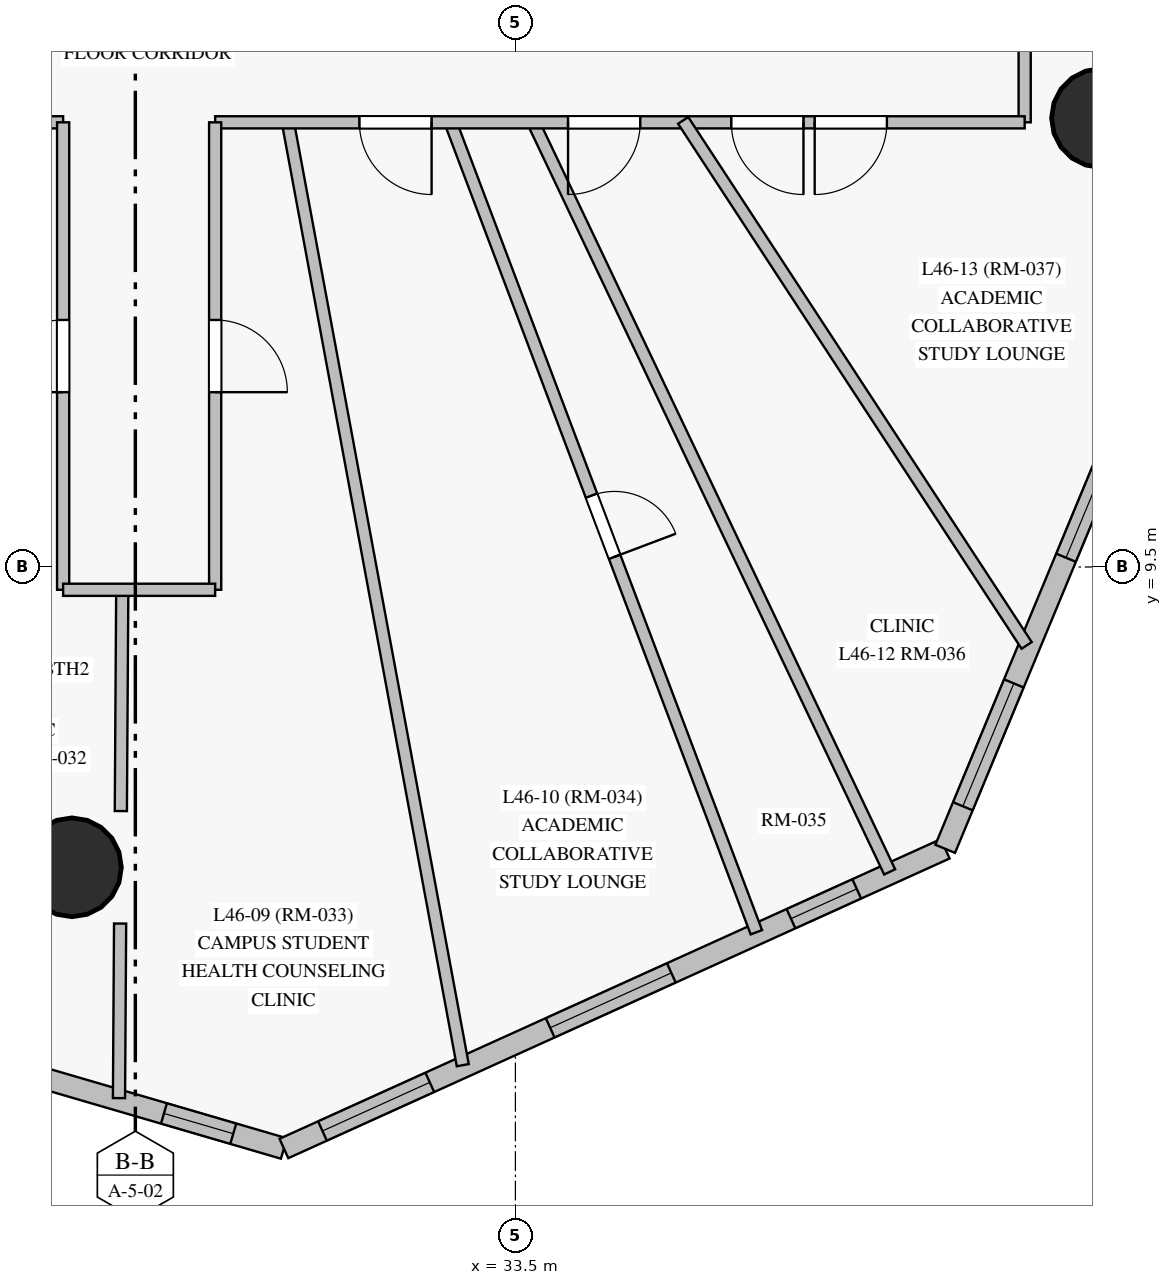
"""IFC4 building model, lengths in metres.
Left out: names, types, materials, properties, quantities, classifications, styles, units other than length and angle.
Written with IfcOpenShell. Run it as: python <this file> out.ifc"""

import sys

from ifc_helpers import new_model, si_unit, direction, frame, frame_2d, origin, origin_with_axes, origin_2d, place, context, subcontext, project, spatial, rectangle, circle, extrude, source, transform, mapped, element, fill, save


model = new_model("IFC4")
c1 = context("Model", 3, precision=1e-05, world=origin(), true_north=direction((0.0, 1.0)))
c2 = subcontext(c1, "Body", "Model", "MODEL_VIEW")
j1 = project(units=[si_unit("LENGTHUNIT", "METRE"), si_unit("PLANEANGLEUNIT", "RADIAN")], contexts=[c1])
p1 = place(None, origin())
s1 = spatial("IfcSite", under=j1, at=p1, CompositionType="ELEMENT")
p2 = place(p1, origin())
s2 = spatial("IfcBuilding", under=s1, at=p2, CompositionType="ELEMENT")
p3 = place(p2, frame((0.0, 0.0, 162.65)))
s3 = spatial("IfcBuildingStorey", under=s2, at=p3, CompositionType="ELEMENT", Elevation=162.65)
m1 = source(origin_with_axes(), c2, "Body", "SweptSolid", [
    extrude(circle(Radius=0.65, at=origin_2d()), origin(), (0.0, 0.0, 1.0), 3.05),
])
for number, where, z_axis, x_axis in (
    (1, (27.666, 5.549, 0.0), (0.0, 0.0, 1.0), (1.0, 0.0, 0.0)),
    (2, (41.204, 15.406, 0.0), (0.0, 0.0, 1.0), (1.0, 0.0, 0.0)),
):
    element("IfcColumn", number, at=place(p3, frame(where, z_axis=z_axis, x_axis=x_axis)), inside=s3, PredefinedType="COLUMN", context=c2, shape_type="MappedRepresentation", body=[
        mapped(m1, transform((0.0, 0.0, 0.0), scale=1.0)),
    ])
p4 = place(p3, frame((18.885, 5.23, 0.0), z_axis=(0.0, 0.0, 1.0), x_axis=(0.959880587049, -0.280409091519, 0.0)))
e3 = element("IfcWall", 3, at=p4, inside=s3, PredefinedType="SOLIDWALL", context=c2, shape_type="SweptSolid", body=[
    extrude(rectangle(XDim=12.053, YDim=0.28, at=frame_2d((6.027, 0.0))), origin(), (0.0, 0.0, 1.0), 2.825),
])
p5 = place(p4, frame((0.763, 0.0, 0.85)))
e4 = element("IfcOpeningElement", 4, at=p5, cuts=e3, PredefinedType="OPENING", context=c2, shape_type="SweptSolid", body=[
    extrude(rectangle(XDim=1.75, YDim=1.65, at=frame_2d((0.875, 0.825))), frame((0.0, 0.15, 0.0), z_axis=(0.0, -1.0, 0.0), x_axis=(1.0, 0.0, 0.0)), (0.0, 0.0, 1.0), 0.3),
])
p6 = place(p4, frame((3.679, 0.0, 0.85)))
e5 = element("IfcOpeningElement", 5, at=p6, cuts=e3, PredefinedType="OPENING", context=c2, shape_type="SweptSolid", body=[
    extrude(rectangle(XDim=1.55, YDim=1.65, at=frame_2d((0.775, 0.825))), frame((0.0, 0.15, 0.0), z_axis=(0.0, -1.0, 0.0), x_axis=(1.0, 0.0, 0.0)), (0.0, 0.0, 1.0), 0.3),
])
p7 = place(p4, frame((6.859, 0.0, 0.85)))
e6 = element("IfcOpeningElement", 6, at=p7, cuts=e3, PredefinedType="OPENING", context=c2, shape_type="SweptSolid", body=[
    extrude(rectangle(XDim=1.75, YDim=1.65, at=frame_2d((0.875, 0.825))), frame((0.0, 0.15, 0.0), z_axis=(0.0, -1.0, 0.0), x_axis=(1.0, 0.0, 0.0)), (0.0, 0.0, 1.0), 0.3),
])
p8 = place(p4, frame((10.409, 0.0, 0.85)))
e7 = element("IfcOpeningElement", 7, at=p8, cuts=e3, PredefinedType="OPENING", context=c2, shape_type="SweptSolid", body=[
    extrude(rectangle(XDim=0.95, YDim=1.5, at=frame_2d((0.475, 0.75))), frame((0.0, 0.15, 0.0), z_axis=(0.0, -1.0, 0.0), x_axis=(1.0, 0.0, 0.0)), (0.0, 0.0, 1.0), 0.3),
])
p9 = place(p3, frame((30.454, 1.85, 0.0), z_axis=(0.0, 0.0, 1.0), x_axis=(0.910849042107, 0.412739654617, 0.0)))
e8 = element("IfcWall", 8, at=p9, inside=s3, PredefinedType="SOLIDWALL", context=c2, shape_type="SweptSolid", body=[
    extrude(rectangle(XDim=9.552, YDim=0.28, at=frame_2d((4.776, 0.0))), origin(), (0.0, 0.0, 1.0), 2.825),
])
p10 = place(p9, frame((0.557, 0.0, 0.85)))
e9 = element("IfcOpeningElement", 9, at=p10, cuts=e8, PredefinedType="OPENING", context=c2, shape_type="SweptSolid", body=[
    extrude(rectangle(XDim=1.55, YDim=1.65, at=frame_2d((0.775, 0.825))), frame((0.0, 0.15, 0.0), z_axis=(0.0, -1.0, 0.0), x_axis=(1.0, 0.0, 0.0)), (0.0, 0.0, 1.0), 0.3),
])
p11 = place(p9, frame((3.846, 0.0, 0.85)))
e10 = element("IfcOpeningElement", 10, at=p11, cuts=e8, PredefinedType="OPENING", context=c2, shape_type="SweptSolid", body=[
    extrude(rectangle(XDim=1.75, YDim=1.65, at=frame_2d((0.875, 0.825))), frame((0.0, 0.15, 0.0), z_axis=(0.0, -1.0, 0.0), x_axis=(1.0, 0.0, 0.0)), (0.0, 0.0, 1.0), 0.3),
])
p12 = place(p9, frame((7.324, 0.0, 0.85)))
e11 = element("IfcOpeningElement", 11, at=p12, cuts=e8, PredefinedType="OPENING", context=c2, shape_type="SweptSolid", body=[
    extrude(rectangle(XDim=0.95, YDim=1.5, at=frame_2d((0.475, 0.75))), frame((0.0, 0.15, 0.0), z_axis=(0.0, -1.0, 0.0), x_axis=(1.0, 0.0, 0.0)), (0.0, 0.0, 1.0), 0.3),
])
p13 = place(p3, frame((39.155, 5.792, 0.0), z_axis=(0.0, 0.0, 1.0), x_axis=(0.383396812416, 0.92358371804, 0.0)))
e12 = element("IfcWall", 12, at=p13, inside=s3, PredefinedType="SOLIDWALL", context=c2, shape_type="SweptSolid", body=[
    extrude(rectangle(XDim=13.959, YDim=0.28, at=frame_2d((6.98, 0.0))), origin(), (0.0, 0.0, 1.0), 2.825),
])
p14 = place(p13, frame((0.606, 0.0, 0.85)))
e13 = element("IfcOpeningElement", 13, at=p14, cuts=e12, PredefinedType="OPENING", context=c2, shape_type="SweptSolid", body=[
    extrude(rectangle(XDim=1.75, YDim=1.65, at=frame_2d((0.875, 0.825))), frame((0.0, 0.15, 0.0), z_axis=(0.0, -1.0, 0.0), x_axis=(1.0, 0.0, 0.0)), (0.0, 0.0, 1.0), 0.3),
])
p15 = place(p13, frame((4.146, 0.0, 0.85)))
e14 = element("IfcOpeningElement", 14, at=p15, cuts=e12, PredefinedType="OPENING", context=c2, shape_type="SweptSolid", body=[
    extrude(rectangle(XDim=1.75, YDim=1.65, at=frame_2d((0.875, 0.825))), frame((0.0, 0.15, 0.0), z_axis=(0.0, -1.0, 0.0), x_axis=(1.0, 0.0, 0.0)), (0.0, 0.0, 1.0), 0.3),
])
p16 = place(p13, frame((7.745, 0.0, 0.85)))
e15 = element("IfcOpeningElement", 15, at=p16, cuts=e12, PredefinedType="OPENING", context=c2, shape_type="SweptSolid", body=[
    extrude(rectangle(XDim=1.75, YDim=1.65, at=frame_2d((0.875, 0.825))), frame((0.0, 0.15, 0.0), z_axis=(0.0, -1.0, 0.0), x_axis=(1.0, 0.0, 0.0)), (0.0, 0.0, 1.0), 0.3),
])
p17 = place(p13, frame((11.444, 0.0, 0.85)))
e16 = element("IfcOpeningElement", 16, at=p17, cuts=e12, PredefinedType="OPENING", context=c2, shape_type="SweptSolid", body=[
    extrude(rectangle(XDim=1.75, YDim=1.65, at=frame_2d((0.875, 0.825))), frame((0.0, 0.15, 0.0), z_axis=(0.0, -1.0, 0.0), x_axis=(1.0, 0.0, 0.0)), (0.0, 0.0, 1.0), 0.3),
])
p18 = place(p3, frame((40.2, 37.65, 0.0), z_axis=(0.0, 0.0, 1.0), x_axis=(0.0, -1.0, 0.0)))
e17 = element("IfcWall", 17, at=p18, inside=s3, PredefinedType="PARTITIONING", context=c2, shape_type="SweptSolid", body=[
    extrude(rectangle(XDim=22.3, YDim=0.16, at=frame_2d((11.15, 0.0))), origin(), (0.0, 0.0, 1.0), 2.375),
])
p19 = place(p18, frame((14.02, 0.0, 0.0)))
e18 = element("IfcOpeningElement", 18, at=p19, cuts=e17, PredefinedType="OPENING", context=c2, shape_type="SweptSolid", body=[
    extrude(rectangle(XDim=0.95, YDim=2.15, at=frame_2d((0.475, 1.075))), frame((0.0, 0.09, 0.0), z_axis=(0.0, -1.0, 0.0), x_axis=(1.0, 0.0, 0.0)), (0.0, 0.0, 1.0), 0.18),
])
p20 = place(p18, frame((10.675, 0.0, 0.0)))
e19 = element("IfcOpeningElement", 19, at=p20, cuts=e17, PredefinedType="OPENING", context=c2, shape_type="SweptSolid", body=[
    extrude(rectangle(XDim=0.95, YDim=2.15, at=frame_2d((0.475, 1.075))), frame((0.0, 0.09, 0.0), z_axis=(0.0, -1.0, 0.0), x_axis=(1.0, 0.0, 0.0)), (0.0, 0.0, 1.0), 0.18),
])
p21 = place(p18, frame((7.33, 0.0, 0.0)))
e20 = element("IfcOpeningElement", 20, at=p21, cuts=e17, PredefinedType="OPENING", context=c2, shape_type="SweptSolid", body=[
    extrude(rectangle(XDim=0.95, YDim=2.15, at=frame_2d((0.475, 1.075))), frame((0.0, 0.09, 0.0), z_axis=(0.0, -1.0, 0.0), x_axis=(1.0, 0.0, 0.0)), (0.0, 0.0, 1.0), 0.18),
])
p22 = place(p18, frame((2.5, 0.0, 0.0)))
e21 = element("IfcOpeningElement", 21, at=p22, cuts=e17, PredefinedType="OPENING", context=c2, shape_type="SweptSolid", body=[
    extrude(rectangle(XDim=0.95, YDim=2.15, at=frame_2d((0.475, 1.075))), frame((0.0, 0.09, 0.0), z_axis=(0.0, -1.0, 0.0), x_axis=(1.0, 0.0, 0.0)), (0.0, 0.0, 1.0), 0.18),
])
p23 = place(p3, frame((30.501, 15.379, 0.0), z_axis=(0.0, 0.0, 1.0), x_axis=(0.182367171239, -0.983230499351, 0.0)))
e22 = element("IfcWall", 22, at=p23, inside=s3, PredefinedType="PARTITIONING", context=c2, shape_type="SweptSolid", body=[
    extrude(rectangle(XDim=12.646, YDim=0.16, at=frame_2d((6.323, 0.0))), origin(), (0.0, 0.0, 1.0), 2.825),
])
p24 = place(p3, frame((32.636, 15.378, 0.0), z_axis=(0.0, 0.0, 1.0), x_axis=(0.353270856326, -0.93552108585, 0.0)))
e23 = element("IfcWall", 23, at=p24, inside=s3, PredefinedType="PARTITIONING", context=c2, shape_type="SweptSolid", body=[
    extrude(rectangle(XDim=11.42, YDim=0.16, at=frame_2d((5.71, 0.0))), origin(), (0.0, 0.0, 1.0), 2.825),
])
p25 = place(p24, frame((5.28, 0.0, 0.0)))
e24 = element("IfcOpeningElement", 24, at=p25, cuts=e23, PredefinedType="OPENING", context=c2, shape_type="SweptSolid", body=[
    extrude(rectangle(XDim=0.86, YDim=2.04, at=frame_2d((0.43, 1.02))), frame((0.0, 0.09, 0.0), z_axis=(0.0, -1.0, 0.0), x_axis=(1.0, 0.0, 0.0)), (0.0, 0.0, 1.0), 0.18),
])
p26 = place(p3, frame((33.722, 15.377, 0.0), z_axis=(0.0, 0.0, 1.0), x_axis=(0.429403808609, -0.903112600483, 0.0)))
e25 = element("IfcWall", 25, at=p26, inside=s3, PredefinedType="PARTITIONING", context=c2, shape_type="SweptSolid", body=[
    extrude(rectangle(XDim=10.949, YDim=0.16, at=frame_2d((5.475, 0.0))), origin(), (0.0, 0.0, 1.0), 2.825),
])
p27 = place(p3, frame((27.55, 15.35, 0.0), z_axis=(0.0, 0.0, 1.0), x_axis=(-1.0, 0.0, 0.0)))
e26 = element("IfcWall", 26, at=p27, inside=s3, PredefinedType="PARTITIONING", context=c2, shape_type="SweptSolid", body=[
    extrude(rectangle(XDim=10.85, YDim=0.16, at=frame_2d((5.425, 0.0))), origin(), (0.0, 0.0, 1.0), 2.375),
])
p28 = place(p27, frame((7.268, 0.0, 0.0)))
e27 = element("IfcOpeningElement", 27, at=p28, cuts=e26, PredefinedType="OPENING", context=c2, shape_type="SweptSolid", body=[
    extrude(rectangle(XDim=0.95, YDim=2.15, at=frame_2d((0.475, 1.075))), frame((0.0, 0.09, 0.0), z_axis=(0.0, -1.0, 0.0), x_axis=(1.0, 0.0, 0.0)), (0.0, 0.0, 1.0), 0.18),
])
p29 = place(p27, frame((4.95, 0.0, 0.0)))
e28 = element("IfcOpeningElement", 28, at=p29, cuts=e26, PredefinedType="OPENING", context=c2, shape_type="SweptSolid", body=[
    extrude(rectangle(XDim=0.95, YDim=2.15, at=frame_2d((0.475, 1.075))), frame((0.0, 0.09, 0.0), z_axis=(0.0, -1.0, 0.0), x_axis=(1.0, 0.0, 0.0)), (0.0, 0.0, 1.0), 0.18),
])
p30 = place(p27, frame((3.282, 0.0, 0.0)))
e29 = element("IfcOpeningElement", 29, at=p30, cuts=e26, PredefinedType="OPENING", context=c2, shape_type="SweptSolid", body=[
    extrude(rectangle(XDim=0.95, YDim=2.15, at=frame_2d((0.475, 1.075))), frame((0.0, 0.09, 0.0), z_axis=(0.0, -1.0, 0.0), x_axis=(1.0, 0.0, 0.0)), (0.0, 0.0, 1.0), 0.18),
])
p31 = place(p3, frame((40.2, 15.35, 0.0), z_axis=(0.0, 0.0, 1.0), x_axis=(-1.0, 0.0, 0.0)))
e30 = element("IfcWall", 30, at=p31, inside=s3, PredefinedType="PARTITIONING", context=c2, shape_type="SweptSolid", body=[
    extrude(rectangle(XDim=10.65, YDim=0.16, at=frame_2d((5.325, 0.0))), origin(), (0.0, 0.0, 1.0), 2.275),
])
p32 = place(p31, frame((7.802, 0.0, 0.0)))
e31 = element("IfcOpeningElement", 31, at=p32, cuts=e30, PredefinedType="OPENING", context=c2, shape_type="SweptSolid", body=[
    extrude(rectangle(XDim=0.95, YDim=2.15, at=frame_2d((0.475, 1.075))), frame((0.0, 0.09, 0.0), z_axis=(0.0, -1.0, 0.0), x_axis=(1.0, 0.0, 0.0)), (0.0, 0.0, 1.0), 0.18),
])
p33 = place(p31, frame((5.058, 0.0, 0.0)))
e32 = element("IfcOpeningElement", 32, at=p33, cuts=e30, PredefinedType="OPENING", context=c2, shape_type="SweptSolid", body=[
    extrude(rectangle(XDim=0.95, YDim=2.15, at=frame_2d((0.475, 1.075))), frame((0.0, 0.09, 0.0), z_axis=(0.0, -1.0, 0.0), x_axis=(1.0, 0.0, 0.0)), (0.0, 0.0, 1.0), 0.18),
])
p34 = place(p31, frame((2.91, 0.0, 0.0)))
e33 = element("IfcOpeningElement", 33, at=p34, cuts=e30, PredefinedType="OPENING", context=c2, shape_type="SweptSolid", body=[
    extrude(rectangle(XDim=0.95, YDim=2.15, at=frame_2d((0.475, 1.075))), frame((0.0, 0.09, 0.0), z_axis=(0.0, -1.0, 0.0), x_axis=(1.0, 0.0, 0.0)), (0.0, 0.0, 1.0), 0.18),
])
p35 = place(p31, frame((1.812, 0.0, 0.0)))
e34 = element("IfcOpeningElement", 34, at=p35, cuts=e30, PredefinedType="OPENING", context=c2, shape_type="SweptSolid", body=[
    extrude(rectangle(XDim=0.95, YDim=2.15, at=frame_2d((0.475, 1.075))), frame((0.0, 0.09, 0.0), z_axis=(0.0, -1.0, 0.0), x_axis=(1.0, 0.0, 0.0)), (0.0, 0.0, 1.0), 0.18),
])
p36 = place(p3, frame((35.707, 15.375, 0.0), z_axis=(0.0, 0.0, 1.0), x_axis=(0.547512330947, -0.836797614397, 0.0)))
e35 = element("IfcWall", 35, at=p36, inside=s3, PredefinedType="PARTITIONING", context=c2, shape_type="SweptSolid", body=[
    extrude(rectangle(XDim=8.254, YDim=0.16, at=frame_2d((4.127, 0.0))), origin(), (0.0, 0.0, 1.0), 2.825),
])
p37 = place(p3, frame((29.55, 15.35, 0.0), z_axis=(0.0, 0.0, 1.0), x_axis=(0.0, -1.0, 0.0)))
e36 = element("IfcWall", 36, at=p37, inside=s3, PredefinedType="PARTITIONING", context=c2, shape_type="SweptSolid", body=[
    extrude(rectangle(XDim=6.15, YDim=0.16, at=frame_2d((3.075, 0.0))), origin(), (0.0, 0.0, 1.0), 2.825),
])
p38 = place(p37, frame((2.6, 0.0, 0.0)))
e37 = element("IfcOpeningElement", 37, at=p38, cuts=e36, PredefinedType="OPENING", context=c2, shape_type="SweptSolid", body=[
    extrude(rectangle(XDim=0.95, YDim=2.15, at=frame_2d((0.475, 1.075))), frame((0.0, 0.09, 0.0), z_axis=(0.0, -1.0, 0.0), x_axis=(1.0, 0.0, 0.0)), (0.0, 0.0, 1.0), 0.18),
])
p39 = place(p3, frame((27.55, 9.2, 0.0), z_axis=(0.0, 0.0, 1.0), x_axis=(0.0, 1.0, 0.0)))
e38 = element("IfcWall", 38, at=p39, inside=s3, PredefinedType="PARTITIONING", context=c2, shape_type="SweptSolid", body=[
    extrude(rectangle(XDim=6.15, YDim=0.16, at=frame_2d((3.075, 0.0))), origin(), (0.0, 0.0, 1.0), 2.275),
])
p40 = place(p39, frame((2.6, 0.0, 0.0)))
e39 = element("IfcOpeningElement", 39, at=p40, cuts=e38, PredefinedType="OPENING", context=c2, shape_type="SweptSolid", body=[
    extrude(rectangle(XDim=0.95, YDim=2.15, at=frame_2d((0.475, 1.075))), frame((0.0, 0.09, 0.0), z_axis=(0.0, -1.0, 0.0), x_axis=(1.0, 0.0, 0.0)), (0.0, 0.0, 1.0), 0.18),
])
p41 = place(p3, frame((40.176, 17.943, 0.0), z_axis=(0.0, 0.0, 1.0), x_axis=(0.809022702955, -0.587777395026, 0.0)))
e40 = element("IfcWall", 40, at=p41, inside=s3, PredefinedType="PARTITIONING", context=c2, shape_type="SweptSolid", body=[
    extrude(rectangle(XDim=3.793, YDim=0.16, at=frame_2d((1.896, 0.0))), origin(), (0.0, 0.0, 1.0), 2.825),
])
p42 = place(p3, frame((28.328, 9.23, 0.0), z_axis=(0.0, 0.0, 1.0), x_axis=(-0.006475042741, -0.999979036691, 0.0)))
e41 = element("IfcWall", 41, at=p42, inside=s3, PredefinedType="PARTITIONING", context=c2, shape_type="SweptSolid", body=[
    extrude(rectangle(XDim=2.941, YDim=0.16, at=frame_2d((1.47, 0.0))), origin(), (0.0, 0.0, 1.0), 2.825),
])
p43 = place(p3, frame((28.3, 4.809, 0.0), z_axis=(0.0, 0.0, 1.0), x_axis=(-0.006484396464, -0.99997897608, 0.0)))
e42 = element("IfcWall", 42, at=p43, inside=s3, PredefinedType="PARTITIONING", context=c2, shape_type="SweptSolid", body=[
    extrude(rectangle(XDim=2.297, YDim=0.16, at=frame_2d((1.148, 0.0))), origin(), (0.0, 0.0, 1.0), 2.825),
])
p44 = place(p3, frame((29.55, 9.2, 0.0), z_axis=(0.0, 0.0, 1.0), x_axis=(-1.0, 0.0, 0.0)))
e43 = element("IfcWall", 43, at=p44, inside=s3, PredefinedType="PARTITIONING", context=c2, shape_type="SweptSolid", body=[
    extrude(rectangle(XDim=2.0, YDim=0.16, at=frame_2d((1.0, 0.0))), origin(), (0.0, 0.0, 1.0), 2.495),
])
m2 = source(origin_with_axes(), c2, "Body", "SweptSolid", [
    extrude(rectangle(XDim=0.95, YDim=1.5, at=frame_2d((0.475, 0.75))), frame((0.0, 0.03, 0.0), z_axis=(0.0, -1.0, 0.0), x_axis=(1.0, 0.0, 0.0)), (0.0, 0.0, 1.0), 0.06),
])
p45 = place(p8, origin())
e44 = element("IfcWindow", 44, at=p45, inside=s3, PartitioningType="SINGLE_PANEL", PredefinedType="WINDOW", context=c2, shape_type="MappedRepresentation", body=[
    mapped(m2, transform((0.0, 0.0, 0.0), scale=1.0)),
])
fill(e7, e44)
m3 = source(origin_with_axes(), c2, "Body", "SweptSolid", [
    extrude(rectangle(XDim=1.55, YDim=1.65, at=frame_2d((0.775, 0.825))), frame((0.0, 0.03, 0.0), z_axis=(0.0, -1.0, 0.0), x_axis=(1.0, 0.0, 0.0)), (0.0, 0.0, 1.0), 0.06),
])
p46 = place(p10, origin())
e45 = element("IfcWindow", 45, at=p46, inside=s3, PartitioningType="SINGLE_PANEL", PredefinedType="WINDOW", context=c2, shape_type="MappedRepresentation", body=[
    mapped(m3, transform((0.0, 0.0, 0.0), scale=1.0)),
])
fill(e9, e45)
m4 = source(origin_with_axes(), c2, "Body", "SweptSolid", [
    extrude(rectangle(XDim=1.75, YDim=1.65, at=frame_2d((0.875, 0.825))), frame((0.0, 0.03, 0.0), z_axis=(0.0, -1.0, 0.0), x_axis=(1.0, 0.0, 0.0)), (0.0, 0.0, 1.0), 0.06),
])
p47 = place(p11, origin())
e46 = element("IfcWindow", 46, at=p47, inside=s3, PartitioningType="SINGLE_PANEL", PredefinedType="WINDOW", context=c2, shape_type="MappedRepresentation", body=[
    mapped(m4, transform((0.0, 0.0, 0.0), scale=1.0)),
])
fill(e10, e46)
p48 = place(p12, origin())
e47 = element("IfcWindow", 47, at=p48, inside=s3, PartitioningType="SINGLE_PANEL", PredefinedType="WINDOW", context=c2, shape_type="MappedRepresentation", body=[
    mapped(m2, transform((0.0, 0.0, 0.0), scale=1.0)),
])
fill(e11, e47)
p49 = place(p14, origin())
e48 = element("IfcWindow", 48, at=p49, inside=s3, PartitioningType="SINGLE_PANEL", PredefinedType="WINDOW", context=c2, shape_type="MappedRepresentation", body=[
    mapped(m4, transform((0.0, 0.0, 0.0), scale=1.0)),
])
fill(e13, e48)
p50 = place(p15, origin())
e49 = element("IfcWindow", 49, at=p50, inside=s3, PartitioningType="SINGLE_PANEL", PredefinedType="WINDOW", context=c2, shape_type="MappedRepresentation", body=[
    mapped(m4, transform((0.0, 0.0, 0.0), scale=1.0)),
])
fill(e14, e49)
m5 = source(origin_with_axes(), c2, "Body", "SweptSolid", [
    extrude(rectangle(XDim=0.95, YDim=2.15, at=frame_2d((0.475, 1.075))), frame((0.0, 0.025, 0.0), z_axis=(0.0, -1.0, 0.0), x_axis=(1.0, 0.0, 0.0)), (0.0, 0.0, 1.0), 0.05),
])
p51 = place(p40, origin())
e50 = element("IfcDoor", 50, at=p51, inside=s3, OperationType="SINGLE_SWING_LEFT", PredefinedType="DOOR", context=c2, shape_type="MappedRepresentation", body=[
    mapped(m5, transform((0.0, 0.0, 0.0), scale=1.0)),
])
fill(e39, e50)
p52 = place(p38, origin())
e51 = element("IfcDoor", 51, at=p52, inside=s3, OperationType="SINGLE_SWING_RIGHT", PredefinedType="DOOR", context=c2, shape_type="MappedRepresentation", body=[
    mapped(m5, transform((0.0, 0.0, 0.0), scale=1.0)),
])
fill(e37, e51)
p53 = place(p32, origin())
e52 = element("IfcDoor", 52, at=p53, inside=s3, OperationType="SINGLE_SWING_LEFT", PredefinedType="DOOR", context=c2, shape_type="MappedRepresentation", body=[
    mapped(m5, transform((0.0, 0.0, 0.0), scale=1.0)),
])
fill(e31, e52)
p54 = place(p33, origin())
e53 = element("IfcDoor", 53, at=p54, inside=s3, OperationType="SINGLE_SWING_RIGHT", PredefinedType="DOOR", context=c2, shape_type="MappedRepresentation", body=[
    mapped(m5, transform((0.0, 0.0, 0.0), scale=1.0)),
])
fill(e32, e53)
p55 = place(p34, origin())
e54 = element("IfcDoor", 54, at=p55, inside=s3, OperationType="SINGLE_SWING_LEFT", PredefinedType="DOOR", context=c2, shape_type="MappedRepresentation", body=[
    mapped(m5, transform((0.0, 0.0, 0.0), scale=1.0)),
])
fill(e33, e54)
p56 = place(p35, origin())
e55 = element("IfcDoor", 55, at=p56, inside=s3, OperationType="SINGLE_SWING_RIGHT", PredefinedType="DOOR", context=c2, shape_type="MappedRepresentation", body=[
    mapped(m5, transform((0.0, 0.0, 0.0), scale=1.0)),
])
fill(e34, e55)
m6 = source(origin_with_axes(), c2, "Body", "SweptSolid", [
    extrude(rectangle(XDim=0.86, YDim=2.04, at=frame_2d((0.43, 1.02))), frame((0.0, 0.025, 0.0), z_axis=(0.0, -1.0, 0.0), x_axis=(1.0, 0.0, 0.0)), (0.0, 0.0, 1.0), 0.05),
])
p57 = place(p25, origin())
e56 = element("IfcDoor", 56, at=p57, inside=s3, OperationType="SINGLE_SWING_RIGHT", PredefinedType="DOOR", context=c2, shape_type="MappedRepresentation", body=[
    mapped(m6, transform((0.0, 0.0, 0.0), scale=1.0)),
])
fill(e24, e56)
save(model, sys.argv[1])
